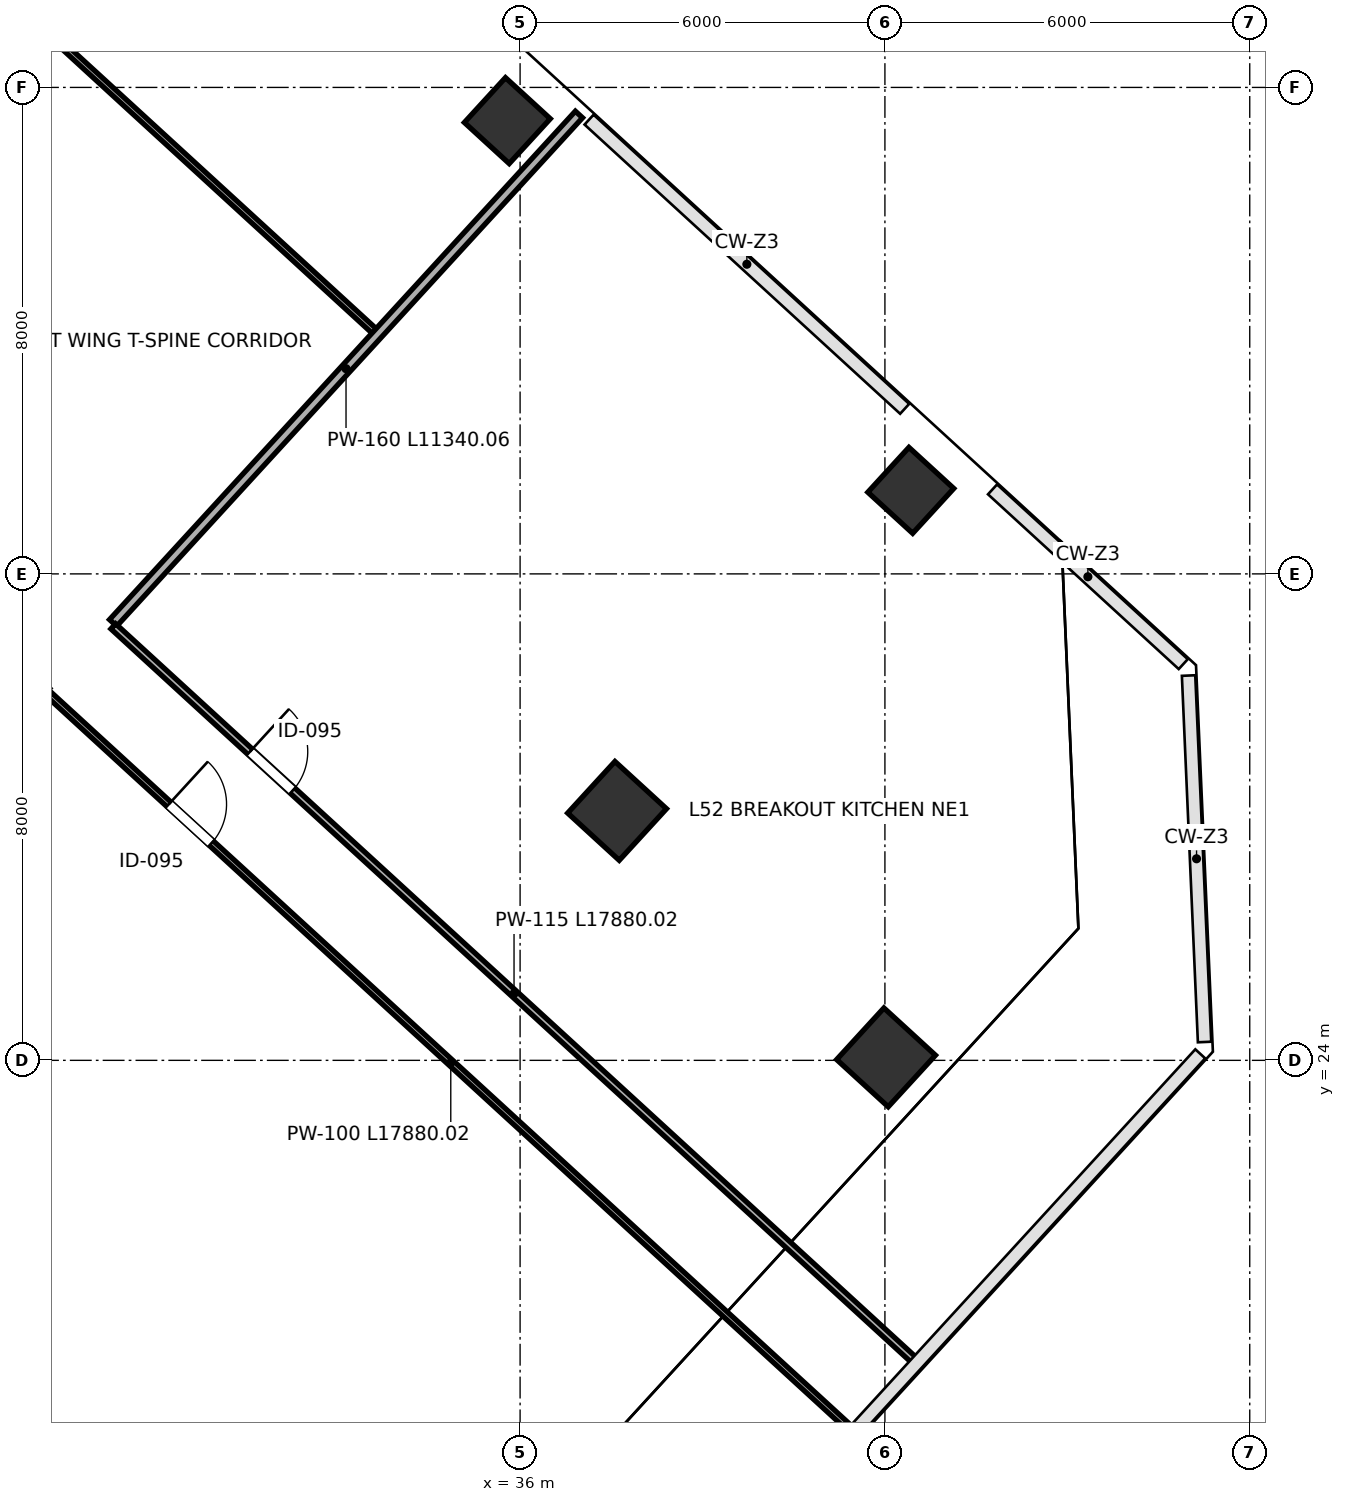
"""IFC4 building model, lengths in metres.
Left out: names, types, materials, properties, quantities, classifications, styles, units other than length and angle.
Written with IfcOpenShell. Run it as: python <this file> out.ifc"""

import sys

from ifc_helpers import new_model, si_unit, direction, frame, frame_2d, origin, origin_2d, place, context, subcontext, project, spatial, rectangle, extrude, source, transform, mapped, element, fill, save


model = new_model("IFC4")
c1 = context("Model", 3, precision=1e-05, world=origin(), true_north=direction((0.0, 1.0)))
c2 = subcontext(c1, "Body", "Model", "MODEL_VIEW")
j1 = project(units=[si_unit("LENGTHUNIT", "METRE"), si_unit("PLANEANGLEUNIT", "RADIAN")], contexts=[c1])
p1 = place(None, origin())
s1 = spatial("IfcSite", under=j1, at=p1, CompositionType="ELEMENT")
p2 = place(p1, origin())
s2 = spatial("IfcBuilding", under=s1, at=p2, CompositionType="ELEMENT")
p3 = place(p2, frame((0.0, 0.0, 233.2)))
s3 = spatial("IfcBuildingStorey", under=s2, at=p3, CompositionType="ELEMENT", Elevation=233.2)
m1 = source(origin(), c2, "Body", "SweptSolid", [
    extrude(rectangle(XDim=1.0, YDim=1.0, at=origin_2d()), origin(), (0.0, 0.0, 1.0), 4.198),
])
p4 = place(p3, frame((35.79, 39.454, 0.001), z_axis=(0.0, 0.0, 1.0), x_axis=(-0.73727733681, 0.675590207616, 0.0)))
e1 = element("IfcColumn", 1, at=p4, inside=s3, PredefinedType="COLUMN", context=c2, shape_type="MappedRepresentation", body=[
    mapped(m1, transform((0.0, 0.0, 0.0), scale=1.0)),
])
m2 = source(origin(), c2, "Body", "SweptSolid", [
    extrude(rectangle(XDim=1.15, YDim=1.15, at=origin_2d()), origin(), (0.0, 0.0, 1.0), 4.198),
])
p5 = place(p3, frame((37.595, 28.102, 0.001), z_axis=(0.0, 0.0, 1.0), x_axis=(-0.73727733681, 0.675590207616, 0.0)))
e2 = element("IfcColumn", 2, at=p5, inside=s3, PredefinedType="COLUMN", context=c2, shape_type="MappedRepresentation", body=[
    mapped(m2, transform((0.0, 0.0, 0.0), scale=1.0)),
])
p6 = place(p3, frame((42.426, 33.374, 0.001), z_axis=(0.0, 0.0, 1.0), x_axis=(-0.73727733681, 0.675590207616, 0.0)))
e3 = element("IfcColumn", 3, at=p6, inside=s3, PredefinedType="COLUMN", context=c2, shape_type="MappedRepresentation", body=[
    mapped(m1, transform((0.0, 0.0, 0.0), scale=1.0)),
])
m3 = source(origin(), c2, "Body", "SweptSolid", [
    extrude(rectangle(XDim=1.15, YDim=1.15, at=origin_2d()), origin(), (0.0, 0.0, 1.0), 4.198),
])
p7 = place(p3, frame((42.019, 24.049, 0.001), z_axis=(0.0, 0.0, 1.0), x_axis=(-0.73727733681, 0.675590207616, 0.0)))
e4 = element("IfcColumn", 4, at=p7, inside=s3, PredefinedType="COLUMN", context=c2, shape_type="MappedRepresentation", body=[
    mapped(m3, transform((0.0, 0.0, 0.0), scale=1.0)),
])
p8 = place(p3, frame((17.504, 50.744, 0.0), z_axis=(0.0, 0.0, 1.0), x_axis=(0.737277850523, -0.675589646996, 0.0)))
e5 = element("IfcWall", 5, at=p8, inside=s3, PredefinedType="PARTITIONING", context=c2, shape_type="SweptSolid", body=[
    extrude(rectangle(XDim=21.87, YDim=0.1, at=frame_2d((10.935, 0.0))), origin(), (0.0, 0.0, 1.0), 3.96),
])
p9 = place(p8, frame((5.4, 0.0, 0.0)))
e6 = element("IfcOpeningElement", 6, at=p9, cuts=e5, PredefinedType="OPENING", context=c2, shape_type="SweptSolid", body=[
    extrude(rectangle(XDim=0.95, YDim=2.15, at=frame_2d((0.475, 1.075))), frame((0.0, 0.06, 0.0), z_axis=(0.0, -1.0, 0.0), x_axis=(1.0, 0.0, 0.0)), (0.0, 0.0, 1.0), 0.12),
])
p10 = place(p3, frame((29.307, 31.194, 0.0), z_axis=(0.0, 0.0, 1.0), x_axis=(0.67558228032, 0.73728460076, 0.0)))
e7 = element("IfcWall", 7, at=p10, inside=s3, PredefinedType="PARTITIONING", context=c2, shape_type="SweptSolid", body=[
    extrude(rectangle(XDim=11.34, YDim=0.16, at=frame_2d((5.67, 0.0))), origin(), (0.0, 0.0, 1.0), 3.195),
])
p11 = place(p3, frame((29.309, 31.138, 0.0), z_axis=(0.0, 0.0, 1.0), x_axis=(0.737278819957, -0.675588589041, 0.0)))
e8 = element("IfcWall", 8, at=p11, inside=s3, PredefinedType="PARTITIONING", context=c2, shape_type="SweptSolid", body=[
    extrude(rectangle(XDim=17.88, YDim=0.115, at=frame_2d((8.94, 0.0))), origin(), (0.0, 0.0, 1.0), 3.252),
])
p12 = place(p11, frame((3.05, 0.0, 0.0)))
e9 = element("IfcOpeningElement", 9, at=p12, cuts=e8, PredefinedType="OPENING", context=c2, shape_type="SweptSolid", body=[
    extrude(rectangle(XDim=0.95, YDim=2.15, at=frame_2d((0.475, 1.075))), frame((0.0, 0.067, 0.0), z_axis=(0.0, -1.0, 0.0), x_axis=(1.0, 0.0, 0.0)), (0.0, 0.0, 1.0), 0.135),
])
p13 = place(p3, frame((28.269, 30.002, 0.0), z_axis=(0.0, 0.0, 1.0), x_axis=(0.737272587758, -0.67559539026, 0.0)))
e10 = element("IfcWall", 10, at=p13, inside=s3, PredefinedType="PARTITIONING", context=c2, shape_type="SweptSolid", body=[
    extrude(rectangle(XDim=17.88, YDim=0.1, at=frame_2d((8.94, 0.0))), origin(), (0.0, 0.0, 1.0), 3.252),
])
p14 = place(p13, frame((2.65, 0.0, 0.0)))
e11 = element("IfcOpeningElement", 11, at=p14, cuts=e10, PredefinedType="OPENING", context=c2, shape_type="SweptSolid", body=[
    extrude(rectangle(XDim=0.95, YDim=2.15, at=frame_2d((0.475, 1.075))), frame((0.0, 0.06, 0.0), z_axis=(0.0, -1.0, 0.0), x_axis=(1.0, 0.0, 0.0)), (0.0, 0.0, 1.0), 0.12),
])
m4 = source(origin(), c2, "Body", "SweptSolid", [
    extrude(rectangle(XDim=0.95, YDim=2.15, at=frame_2d((0.475, 1.075))), frame((0.0, 0.025, 0.0), z_axis=(0.0, -1.0, 0.0), x_axis=(1.0, 0.0, 0.0)), (0.0, 0.0, 1.0), 0.05),
])
p15 = place(p12, origin())
e12 = element("IfcDoor", 12, at=p15, inside=s3, OperationType="SINGLE_SWING_LEFT", PredefinedType="DOOR", context=c2, shape_type="MappedRepresentation", body=[
    mapped(m4, transform((0.0, 0.0, 0.0), scale=1.0)),
])
fill(e9, e12)
p16 = place(p14, origin())
e13 = element("IfcDoor", 13, at=p16, inside=s3, OperationType="SINGLE_SWING_LEFT", PredefinedType="DOOR", context=c2, shape_type="MappedRepresentation", body=[
    mapped(m4, transform((0.0, 0.0, 0.0), scale=1.0)),
])
fill(e11, e13)
save(model, sys.argv[1])
